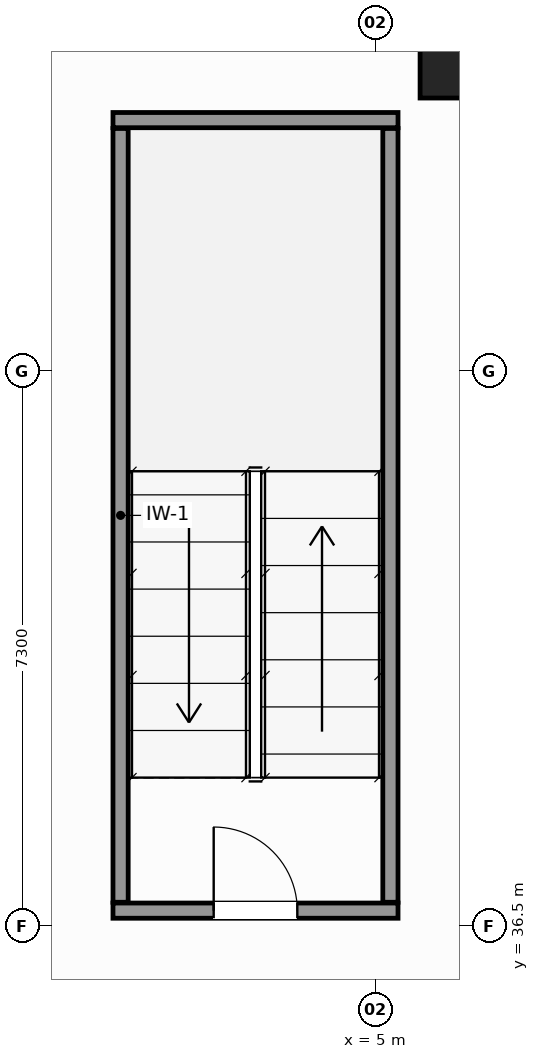
"""IFC4 building model, lengths in metres.
Left out: names, types, materials, properties, quantities, classifications, styles, units other than length and angle.
Written with IfcOpenShell. Run it as: python <this file> out.ifc"""

import sys

from ifc_helpers import new_model, si_unit, direction, frame, frame_2d, origin, origin_2d, place, context, subcontext, project, spatial, rectangle, hollow_circle, extrude, source, transform, mapped, element, fill, save


model = new_model("IFC4")
c1 = context("Model", 3, precision=1e-05, world=origin(), true_north=direction((0.0, 1.0)))
c2 = subcontext(c1, "Body", "Model", "MODEL_VIEW")
j1 = project(units=[si_unit("LENGTHUNIT", "METRE"), si_unit("PLANEANGLEUNIT", "RADIAN")], contexts=[c1])
p1 = place(None, origin())
s1 = spatial("IfcSite", under=j1, at=p1, CompositionType="ELEMENT")
p2 = place(p1, origin())
s2 = spatial("IfcBuilding", under=s1, at=p2, CompositionType="ELEMENT")
p3 = place(p2, frame((0.0, 0.0, 10.0)))
s3 = spatial("IfcBuildingStorey", under=s2, at=p3, CompositionType="ELEMENT", Elevation=10.0)
m1 = source(origin(), c2, "Body", "SweptSolid", [
    extrude(hollow_circle(Radius=0.61, WallThickness=0.05, at=origin_2d()), origin(), (0.0, 0.0, 1.0), 4.4),
])
p4 = place(p3, frame((6.2, 48.0, 0.0), z_axis=(0.0, 0.0, 1.0), x_axis=(1.0, 0.0, 0.0)))
e1 = element("IfcColumn", 1, at=p4, inside=s3, PredefinedType="COLUMN", context=c2, shape_type="MappedRepresentation", body=[
    mapped(m1, transform((0.0, 0.0, 0.0), scale=1.0)),
])
p5 = place(p3, frame((1.55, 36.7, 0.0), z_axis=(0.0, 0.0, 1.0), x_axis=(1.0, 0.0, 0.0)))
e2 = element("IfcWall", 2, at=p5, inside=s3, PredefinedType="SOLIDWALL", context=c2, shape_type="SweptSolid", body=[
    extrude(rectangle(XDim=3.75, YDim=0.2, at=frame_2d((1.875, 0.0))), origin(), (0.0, 0.0, 1.0), 4.4),
])
p6 = place(p5, frame((1.325, 0.0, 0.0)))
e3 = element("IfcOpeningElement", 3, at=p6, cuts=e2, PredefinedType="OPENING", context=c2, shape_type="SweptSolid", body=[
    extrude(rectangle(XDim=1.1, YDim=2.15, at=frame_2d((0.55, 1.075))), frame((0.0, 0.11, 0.0), z_axis=(0.0, -1.0, 0.0), x_axis=(1.0, 0.0, 0.0)), (0.0, 0.0, 1.0), 0.22),
])
p7 = place(p3, frame((1.55, 47.1, 0.0), z_axis=(0.0, 0.0, 1.0), x_axis=(1.0, 0.0, 0.0)))
e4 = element("IfcWall", 4, at=p7, inside=s3, PredefinedType="SOLIDWALL", context=c2, shape_type="SweptSolid", body=[
    extrude(rectangle(XDim=3.75, YDim=0.2, at=frame_2d((1.875, 0.0))), origin(), (0.0, 0.0, 1.0), 4.4),
])
for number, where, z_axis, x_axis in (
    (5, (1.65, 36.81, 0.0), (0.0, 0.0, 1.0), (0.0, 1.0, 0.0)),
    (6, (5.2, 36.81, 0.0), (0.0, 0.0, 1.0), (0.0, 1.0, 0.0)),
):
    element("IfcWall", number, at=place(p3, frame(where, z_axis=z_axis, x_axis=x_axis)), inside=s3, PredefinedType="SOLIDWALL", context=c2, shape_type="SweptSolid", body=[
        extrude(rectangle(XDim=10.18, YDim=0.2, at=frame_2d((5.09, 0.0))), origin(), (0.0, 0.0, 1.0), 4.4),
    ])
m2 = source(origin(), c2, "Body", "SweptSolid", [
    extrude(rectangle(XDim=1.1, YDim=2.15, at=frame_2d((0.55, 1.075))), frame((0.0, 0.025, 0.0), z_axis=(0.0, -1.0, 0.0), x_axis=(1.0, 0.0, 0.0)), (0.0, 0.0, 1.0), 0.05),
])
p8 = place(p6, origin())
e7 = element("IfcDoor", 7, at=p8, inside=s3, OperationType="SINGLE_SWING_LEFT", PredefinedType="DOOR", context=c2, shape_type="MappedRepresentation", body=[
    mapped(m2, transform((0.0, 0.0, 0.0), scale=1.0)),
])
fill(e3, e7)
save(model, sys.argv[1])
